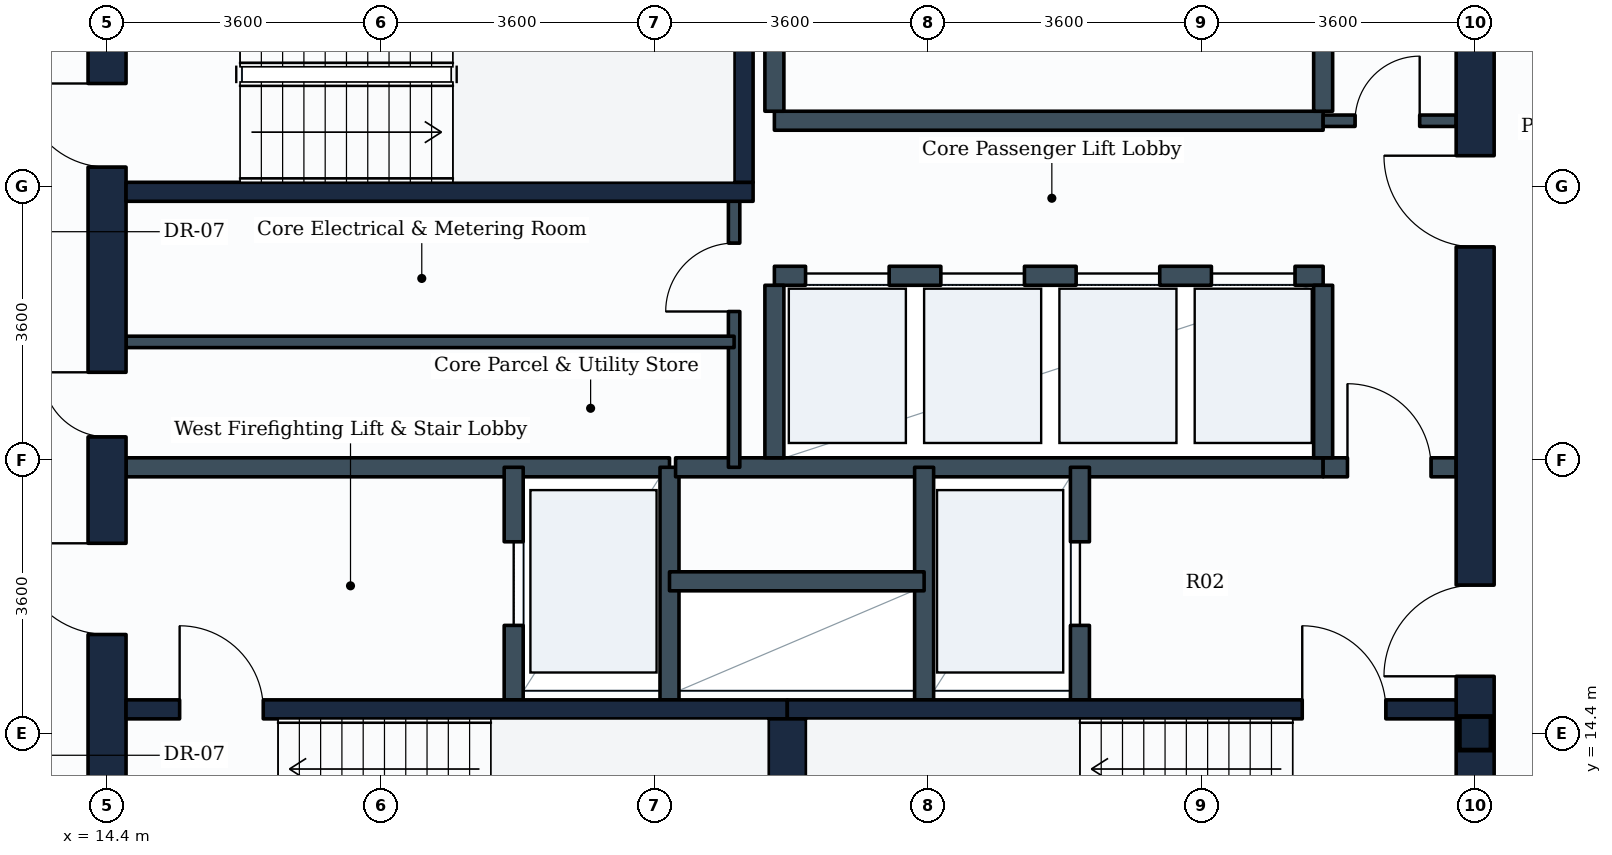
"""IFC4 building model, lengths in metres.
Left out: names, types, materials, properties, quantities, classifications, styles, units other than length and angle.
Written with IfcOpenShell. Run it as: python <this file> out.ifc"""

import sys

from ifc_helpers import new_model, si_unit, direction, frame, frame_2d, origin, origin_2d, place, context, subcontext, project, spatial, rectangle, i_section, extrude, element, fill, save


model = new_model("IFC4")
c1 = context("Model", 3, precision=1e-05, world=origin(), true_north=direction((0.0, 1.0)))
c2 = subcontext(c1, "Body", "Model", "MODEL_VIEW")
j1 = project(units=[si_unit("LENGTHUNIT", "METRE"), si_unit("PLANEANGLEUNIT", "RADIAN")], contexts=[c1])
p1 = place(None, origin())
s1 = spatial("IfcSite", under=j1, at=p1, CompositionType="ELEMENT")
p2 = place(p1, origin())
s2 = spatial("IfcBuilding", under=s1, at=p2, CompositionType="ELEMENT")
p3 = place(p2, frame((0.0, 0.0, 146.6)))
s3 = spatial("IfcBuildingStorey", under=s2, at=p3, CompositionType="ELEMENT", Elevation=146.6)
p4 = place(p3, frame((32.4, 14.4, 0.0), z_axis=(0.0, 0.0, 1.0), x_axis=(1.0, 0.0, 0.0)))
e1 = element("IfcColumn", 1, at=p4, inside=s3, PredefinedType="COLUMN", context=c2, shape_type="SweptSolid", body=[
    extrude(i_section(OverallWidth=0.416, OverallDepth=0.442, WebThickness=0.025, FlangeThickness=0.041, FilletRadius=0.015, at=origin_2d()), origin(), (0.0, 0.0, 1.0), 3.8),
])
p5 = place(p3, frame((14.4, 10.8, 0.0), z_axis=(0.0, 0.0, 1.0), x_axis=(0.0, 1.0, 0.0)))
e2 = element("IfcWall", 2, at=p5, inside=s3, PredefinedType="SHEAR", context=c2, shape_type="SweptSolid", body=[
    extrude(rectangle(XDim=14.4, YDim=0.5, at=frame_2d((7.2, 0.0))), origin(), (0.0, 0.0, 1.0), 3.55),
])
p6 = place(p5, frame((11.05, 0.0, 0.0)))
e3 = element("IfcOpeningElement", 3, at=p6, cuts=e2, PredefinedType="OPENING", context=c2, shape_type="SweptSolid", body=[
    extrude(rectangle(XDim=1.1, YDim=2.1, at=frame_2d((0.55, 1.05))), frame((0.0, 0.26, 0.0), z_axis=(0.0, -1.0, 0.0), x_axis=(1.0, 0.0, 0.0)), (0.0, 0.0, 1.0), 0.52),
])
p7 = place(p5, frame((4.9, 0.0, 0.0)))
e4 = element("IfcOpeningElement", 4, at=p7, cuts=e2, PredefinedType="OPENING", context=c2, shape_type="SweptSolid", body=[
    extrude(rectangle(XDim=1.2, YDim=2.1, at=frame_2d((0.6, 1.05))), frame((0.0, 0.26, 0.0), z_axis=(0.0, -1.0, 0.0), x_axis=(1.0, 0.0, 0.0)), (0.0, 0.0, 1.0), 0.52),
])
p8 = place(p5, frame((7.5, 0.0, 0.0)))
e5 = element("IfcOpeningElement", 5, at=p8, cuts=e2, PredefinedType="OPENING", context=c2, shape_type="SweptSolid", body=[
    extrude(rectangle(XDim=0.85, YDim=2.1, at=frame_2d((0.425, 1.05))), frame((0.0, 0.26, 0.0), z_axis=(0.0, -1.0, 0.0), x_axis=(1.0, 0.0, 0.0)), (0.0, 0.0, 1.0), 0.52),
])
p9 = place(p3, frame((32.4, 10.8, 0.0), z_axis=(0.0, 0.0, 1.0), x_axis=(0.0, 1.0, 0.0)))
e6 = element("IfcWall", 6, at=p9, inside=s3, PredefinedType="SHEAR", context=c2, shape_type="SweptSolid", body=[
    extrude(rectangle(XDim=14.4, YDim=0.5, at=frame_2d((7.2, 0.0))), origin(), (0.0, 0.0, 1.0), 3.55),
])
p10 = place(p9, frame((4.35, 0.0, 0.0)))
e7 = element("IfcOpeningElement", 7, at=p10, cuts=e6, PredefinedType="OPENING", context=c2, shape_type="SweptSolid", body=[
    extrude(rectangle(XDim=1.2, YDim=2.1, at=frame_2d((0.6, 1.05))), frame((0.0, 0.26, 0.0), z_axis=(0.0, -1.0, 0.0), x_axis=(1.0, 0.0, 0.0)), (0.0, 0.0, 1.0), 0.52),
])
p11 = place(p9, frame((10.0, 0.0, 0.0)))
e8 = element("IfcOpeningElement", 8, at=p11, cuts=e6, PredefinedType="OPENING", context=c2, shape_type="SweptSolid", body=[
    extrude(rectangle(XDim=1.2, YDim=2.1, at=frame_2d((0.6, 1.05))), frame((0.0, 0.26, 0.0), z_axis=(0.0, -1.0, 0.0), x_axis=(1.0, 0.0, 0.0)), (0.0, 0.0, 1.0), 0.52),
])
p12 = place(p3, frame((14.65, 14.715, 0.0), z_axis=(0.0, 0.0, 1.0), x_axis=(1.0, 0.0, 0.0)))
e9 = element("IfcWall", 9, at=p12, inside=s3, PredefinedType="SHEAR", context=c2, shape_type="SweptSolid", body=[
    extrude(rectangle(XDim=8.7, YDim=0.25, at=frame_2d((4.35, 0.0))), origin(), (0.0, 0.0, 1.0), 3.55),
])
p13 = place(p12, frame((0.705, 0.0, 0.0)))
e10 = element("IfcOpeningElement", 10, at=p13, cuts=e9, PredefinedType="OPENING", context=c2, shape_type="SweptSolid", body=[
    extrude(rectangle(XDim=1.1, YDim=2.1, at=frame_2d((0.55, 1.05))), frame((0.0, 0.135, 0.0), z_axis=(0.0, -1.0, 0.0), x_axis=(1.0, 0.0, 0.0)), (0.0, 0.0, 1.0), 0.27),
])
p14 = place(p3, frame((23.35, 14.715, 0.0), z_axis=(0.0, 0.0, 1.0), x_axis=(1.0, 0.0, 0.0)))
e11 = element("IfcWall", 11, at=p14, inside=s3, PredefinedType="SHEAR", context=c2, shape_type="SweptSolid", body=[
    extrude(rectangle(XDim=8.8, YDim=0.25, at=frame_2d((4.4, 0.0))), origin(), (0.0, 0.0, 1.0), 3.55),
])
p15 = place(p14, frame((6.775, 0.0, 0.0)))
e12 = element("IfcOpeningElement", 12, at=p15, cuts=e11, PredefinedType="OPENING", context=c2, shape_type="SweptSolid", body=[
    extrude(rectangle(XDim=1.1, YDim=2.1, at=frame_2d((0.55, 1.05))), frame((0.0, 0.135, 0.0), z_axis=(0.0, -1.0, 0.0), x_axis=(1.0, 0.0, 0.0)), (0.0, 0.0, 1.0), 0.27),
])
p16 = place(p3, frame((23.35, 11.75, 0.0), z_axis=(0.0, 0.0, 1.0), x_axis=(0.0, 1.0, 0.0)))
e13 = element("IfcWall", 13, at=p16, inside=s3, PredefinedType="SHEAR", context=c2, shape_type="SweptSolid", body=[
    extrude(rectangle(XDim=2.84, YDim=0.5, at=frame_2d((1.42, 0.0))), origin(), (0.0, 0.0, 1.0), 3.55),
])
p17 = place(p3, frame((14.65, 21.525, 0.0), z_axis=(0.0, 0.0, 1.0), x_axis=(1.0, 0.0, 0.0)))
e14 = element("IfcWall", 14, at=p17, inside=s3, PredefinedType="SHEAR", context=c2, shape_type="SweptSolid", body=[
    extrude(rectangle(XDim=8.25, YDim=0.25, at=frame_2d((4.125, 0.0))), origin(), (0.0, 0.0, 1.0), 3.55),
])
p18 = place(p3, frame((22.775, 21.65, 0.0), z_axis=(0.0, 0.0, 1.0), x_axis=(0.0, 1.0, 0.0)))
e15 = element("IfcWall", 15, at=p18, inside=s3, PredefinedType="SHEAR", context=c2, shape_type="SweptSolid", body=[
    extrude(rectangle(XDim=2.84, YDim=0.25, at=frame_2d((1.42, 0.0))), origin(), (0.0, 0.0, 1.0), 3.55),
])
p19 = place(p3, frame((14.65, 17.9, 0.0), z_axis=(0.0, 0.0, 1.0), x_axis=(1.0, 0.0, 0.0)))
e16 = element("IfcWall", 16, at=p19, inside=s3, PredefinedType="PARTITIONING", context=c2, shape_type="SweptSolid", body=[
    extrude(rectangle(XDim=7.15, YDim=0.25, at=frame_2d((3.575, 0.0))), origin(), (0.0, 0.0, 1.0), 3.535),
])
p20 = place(p3, frame((19.75, 14.84, 0.0), z_axis=(0.0, 0.0, 1.0), x_axis=(0.0, 1.0, 0.0)))
e17 = element("IfcWall", 17, at=p20, inside=s3, PredefinedType="PARTITIONING", context=c2, shape_type="SweptSolid", body=[
    extrude(rectangle(XDim=3.06, YDim=0.25, at=frame_2d((1.53, 0.0))), origin(), (0.0, 0.0, 1.0), 3.535),
])
p21 = place(p20, frame((0.98, 0.0, 0.0)))
e18 = element("IfcOpeningElement", 18, at=p21, cuts=e17, PredefinedType="OPENING", context=c2, shape_type="SweptSolid", body=[
    extrude(rectangle(XDim=1.1, YDim=2.1, at=frame_2d((0.55, 1.05))), frame((0.0, 0.135, 0.0), z_axis=(0.0, -1.0, 0.0), x_axis=(1.0, 0.0, 0.0)), (0.0, 0.0, 1.0), 0.27),
])
p22 = place(p3, frame((21.8, 14.84, 0.0), z_axis=(0.0, 0.0, 1.0), x_axis=(0.0, 1.0, 0.0)))
e19 = element("IfcWall", 19, at=p22, inside=s3, PredefinedType="PARTITIONING", context=c2, shape_type="SweptSolid", body=[
    extrude(rectangle(XDim=3.06, YDim=0.25, at=frame_2d((1.53, 0.0))), origin(), (0.0, 0.0, 1.0), 3.535),
])
p23 = place(p3, frame((21.88, 17.9, 0.0), z_axis=(0.0, 0.0, 1.0), x_axis=(1.0, 0.0, 0.0)))
e20 = element("IfcWall", 20, at=p23, inside=s3, PredefinedType="PARTITIONING", context=c2, shape_type="SweptSolid", body=[
    extrude(rectangle(XDim=8.52, YDim=0.25, at=frame_2d((4.26, 0.0))), origin(), (0.0, 0.0, 1.0), 3.535),
])
p24 = place(p3, frame((30.4, 17.9, 0.0), z_axis=(0.0, 0.0, 1.0), x_axis=(1.0, 0.0, 0.0)))
e21 = element("IfcWall", 21, at=p24, inside=s3, PredefinedType="PARTITIONING", context=c2, shape_type="SweptSolid", body=[
    extrude(rectangle(XDim=1.75, YDim=0.25, at=frame_2d((0.875, 0.0))), origin(), (0.0, 0.0, 1.0), 3.535),
])
p25 = place(p24, frame((0.32, 0.0, 0.0)))
e22 = element("IfcOpeningElement", 22, at=p25, cuts=e21, PredefinedType="OPENING", context=c2, shape_type="SweptSolid", body=[
    extrude(rectangle(XDim=1.1, YDim=2.1, at=frame_2d((0.55, 1.05))), frame((0.0, 0.135, 0.0), z_axis=(0.0, -1.0, 0.0), x_axis=(1.0, 0.0, 0.0)), (0.0, 0.0, 1.0), 0.27),
])
p26 = place(p3, frame((25.15, 14.84, 0.0), z_axis=(0.0, 0.0, 1.0), x_axis=(0.0, 1.0, 0.0)))
e23 = element("IfcWall", 23, at=p26, inside=s3, PredefinedType="PARTITIONING", context=c2, shape_type="SweptSolid", body=[
    extrude(rectangle(XDim=3.06, YDim=0.25, at=frame_2d((1.53, 0.0))), origin(), (0.0, 0.0, 1.0), 3.535),
])
p27 = place(p3, frame((27.2, 14.84, 0.0), z_axis=(0.0, 0.0, 1.0), x_axis=(0.0, 1.0, 0.0)))
e24 = element("IfcWall", 24, at=p27, inside=s3, PredefinedType="PARTITIONING", context=c2, shape_type="SweptSolid", body=[
    extrude(rectangle(XDim=3.06, YDim=0.25, at=frame_2d((1.53, 0.0))), origin(), (0.0, 0.0, 1.0), 3.535),
])
p28 = place(p27, frame((0.98, 0.0, 0.0)))
e25 = element("IfcOpeningElement", 25, at=p28, cuts=e24, PredefinedType="OPENING", context=c2, shape_type="SweptSolid", body=[
    extrude(rectangle(XDim=1.1, YDim=2.1, at=frame_2d((0.55, 1.05))), frame((0.0, 0.135, 0.0), z_axis=(0.0, -1.0, 0.0), x_axis=(1.0, 0.0, 0.0)), (0.0, 0.0, 1.0), 0.27),
])
p29 = place(p3, frame((21.8, 16.4, 0.0), z_axis=(0.0, 0.0, 1.0), x_axis=(1.0, 0.0, 0.0)))
e26 = element("IfcWall", 26, at=p29, inside=s3, PredefinedType="PARTITIONING", context=c2, shape_type="SweptSolid", body=[
    extrude(rectangle(XDim=3.35, YDim=0.25, at=frame_2d((1.675, 0.0))), origin(), (0.0, 0.0, 1.0), 3.535),
])
p30 = place(p3, frame((23.18, 20.42, 0.0), z_axis=(0.0, 0.0, 1.0), x_axis=(1.0, 0.0, 0.0)))
e27 = element("IfcWall", 27, at=p30, inside=s3, PredefinedType="PARTITIONING", context=c2, shape_type="SweptSolid", body=[
    extrude(rectangle(XDim=7.22, YDim=0.25, at=frame_2d((3.61, 0.0))), origin(), (0.0, 0.0, 1.0), 3.535),
])
p31 = place(p30, frame((0.41, 0.0, 0.0)))
e28 = element("IfcOpeningElement", 28, at=p31, cuts=e27, PredefinedType="OPENING", context=c2, shape_type="SweptSolid", body=[
    extrude(rectangle(XDim=1.1, YDim=2.1, at=frame_2d((0.55, 1.05))), frame((0.0, 0.135, 0.0), z_axis=(0.0, -1.0, 0.0), x_axis=(1.0, 0.0, 0.0)), (0.0, 0.0, 1.0), 0.27),
])
p32 = place(p30, frame((2.19, 0.0, 0.0)))
e29 = element("IfcOpeningElement", 29, at=p32, cuts=e27, PredefinedType="OPENING", context=c2, shape_type="SweptSolid", body=[
    extrude(rectangle(XDim=1.1, YDim=2.1, at=frame_2d((0.55, 1.05))), frame((0.0, 0.135, 0.0), z_axis=(0.0, -1.0, 0.0), x_axis=(1.0, 0.0, 0.0)), (0.0, 0.0, 1.0), 0.27),
])
p33 = place(p30, frame((3.97, 0.0, 0.0)))
e30 = element("IfcOpeningElement", 30, at=p33, cuts=e27, PredefinedType="OPENING", context=c2, shape_type="SweptSolid", body=[
    extrude(rectangle(XDim=1.1, YDim=2.1, at=frame_2d((0.55, 1.05))), frame((0.0, 0.135, 0.0), z_axis=(0.0, -1.0, 0.0), x_axis=(1.0, 0.0, 0.0)), (0.0, 0.0, 1.0), 0.27),
])
p34 = place(p30, frame((5.75, 0.0, 0.0)))
e31 = element("IfcOpeningElement", 31, at=p34, cuts=e27, PredefinedType="OPENING", context=c2, shape_type="SweptSolid", body=[
    extrude(rectangle(XDim=1.1, YDim=2.1, at=frame_2d((0.55, 1.05))), frame((0.0, 0.135, 0.0), z_axis=(0.0, -1.0, 0.0), x_axis=(1.0, 0.0, 0.0)), (0.0, 0.0, 1.0), 0.27),
])
for number, where, z_axis, x_axis in (
    (32, (23.18, 18.025, 0.0), (0.0, 0.0, 1.0), (0.0, 1.0, 0.0)),
    (33, (30.4, 18.025, 0.0), (0.0, 0.0, 1.0), (0.0, 1.0, 0.0)),
):
    element("IfcWall", number, at=place(p3, frame(where, z_axis=z_axis, x_axis=x_axis)), inside=s3, PredefinedType="PARTITIONING", context=c2, shape_type="SweptSolid", body=[
        extrude(rectangle(XDim=2.27, YDim=0.25, at=frame_2d((1.135, 0.0))), origin(), (0.0, 0.0, 1.0), 3.535),
    ])
p35 = place(p3, frame((23.18, 22.46, 0.0), z_axis=(0.0, 0.0, 1.0), x_axis=(1.0, 0.0, 0.0)))
e34 = element("IfcWall", 34, at=p35, inside=s3, PredefinedType="PARTITIONING", context=c2, shape_type="SweptSolid", body=[
    extrude(rectangle(XDim=7.22, YDim=0.25, at=frame_2d((3.61, 0.0))), origin(), (0.0, 0.0, 1.0), 3.535),
])
for number, where, z_axis, x_axis in (
    (35, (23.18, 22.585, 0.0), (0.0, 0.0, 1.0), (0.0, 1.0, 0.0)),
    (36, (30.4, 22.585, 0.0), (0.0, 0.0, 1.0), (0.0, 1.0, 0.0)),
):
    element("IfcWall", number, at=place(p3, frame(where, z_axis=z_axis, x_axis=x_axis)), inside=s3, PredefinedType="PARTITIONING", context=c2, shape_type="SweptSolid", body=[
        extrude(rectangle(XDim=2.315, YDim=0.25, at=frame_2d((1.157, 0.0))), origin(), (0.0, 0.0, 1.0), 3.535),
    ])
p36 = place(p3, frame((22.65, 17.9, 0.0), z_axis=(0.0, 0.0, 1.0), x_axis=(0.0, 1.0, 0.0)))
e37 = element("IfcWall", 37, at=p36, inside=s3, PredefinedType="PARTITIONING", context=c2, shape_type="SweptSolid", body=[
    extrude(rectangle(XDim=3.625, YDim=0.15, at=frame_2d((1.812, 0.0))), origin(), (0.0, 0.0, 1.0), 3.535),
])
p37 = place(p36, frame((2.05, 0.0, 0.0)))
e38 = element("IfcOpeningElement", 38, at=p37, cuts=e37, PredefinedType="OPENING", context=c2, shape_type="SweptSolid", body=[
    extrude(rectangle(XDim=0.9, YDim=2.1, at=frame_2d((0.45, 1.05))), frame((0.0, 0.085, 0.0), z_axis=(0.0, -1.0, 0.0), x_axis=(1.0, 0.0, 0.0)), (0.0, 0.0, 1.0), 0.17),
])
p38 = place(p3, frame((14.65, 19.55, 0.0), z_axis=(0.0, 0.0, 1.0), x_axis=(1.0, 0.0, 0.0)))
e39 = element("IfcWall", 39, at=p38, inside=s3, PredefinedType="PARTITIONING", context=c2, shape_type="SweptSolid", body=[
    extrude(rectangle(XDim=8.0, YDim=0.15, at=frame_2d((4.0, 0.0))), origin(), (0.0, 0.0, 1.0), 3.535),
])
p39 = place(p3, frame((30.4, 22.46, 0.0), z_axis=(0.0, 0.0, 1.0), x_axis=(1.0, 0.0, 0.0)))
e40 = element("IfcWall", 40, at=p39, inside=s3, PredefinedType="PARTITIONING", context=c2, shape_type="SweptSolid", body=[
    extrude(rectangle(XDim=1.75, YDim=0.15, at=frame_2d((0.875, 0.0))), origin(), (0.0, 0.0, 1.0), 3.535),
])
p40 = place(p39, frame((0.42, 0.0, 0.0)))
e41 = element("IfcOpeningElement", 41, at=p40, cuts=e40, PredefinedType="OPENING", context=c2, shape_type="SweptSolid", body=[
    extrude(rectangle(XDim=0.85, YDim=2.1, at=frame_2d((0.425, 1.05))), frame((0.0, 0.085, 0.0), z_axis=(0.0, -1.0, 0.0), x_axis=(1.0, 0.0, 0.0)), (0.0, 0.0, 1.0), 0.17),
])
p41 = place(p13, origin())
e42 = element("IfcDoor", 42, at=p41, inside=s3, OperationType="SINGLE_SWING_LEFT", PredefinedType="DOOR", context=c2, shape_type="SweptSolid", body=[
    extrude(rectangle(XDim=1.1, YDim=2.1, at=frame_2d((0.55, 1.05))), frame((0.0, 0.025, 0.0), z_axis=(0.0, -1.0, 0.0), x_axis=(1.0, 0.0, 0.0)), (0.0, 0.0, 1.0), 0.05),
])
fill(e10, e42)
p42 = place(p15, origin())
e43 = element("IfcDoor", 43, at=p42, inside=s3, OperationType="SINGLE_SWING_LEFT", PredefinedType="DOOR", context=c2, shape_type="SweptSolid", body=[
    extrude(rectangle(XDim=1.1, YDim=2.1, at=frame_2d((0.55, 1.05))), frame((0.0, 0.025, 0.0), z_axis=(0.0, -1.0, 0.0), x_axis=(1.0, 0.0, 0.0)), (0.0, 0.0, 1.0), 0.05),
])
fill(e12, e43)
p43 = place(p6, origin())
e44 = element("IfcDoor", 44, at=p43, inside=s3, OperationType="SINGLE_SWING_RIGHT", PredefinedType="DOOR", context=c2, shape_type="SweptSolid", body=[
    extrude(rectangle(XDim=1.1, YDim=2.1, at=frame_2d((0.55, 1.05))), frame((0.0, 0.025, 0.0), z_axis=(0.0, -1.0, 0.0), x_axis=(1.0, 0.0, 0.0)), (0.0, 0.0, 1.0), 0.05),
])
fill(e3, e44)
p44 = place(p21, origin())
e45 = element("IfcDoor", 45, at=p44, inside=s3, OperationType="SLIDING_TO_LEFT", PredefinedType="DOOR", context=c2, shape_type="SweptSolid", body=[
    extrude(rectangle(XDim=1.1, YDim=2.1, at=frame_2d((0.55, 1.05))), frame((0.0, 0.025, 0.0), z_axis=(0.0, -1.0, 0.0), x_axis=(1.0, 0.0, 0.0)), (0.0, 0.0, 1.0), 0.05),
])
fill(e18, e45)
p45 = place(p28, origin())
e46 = element("IfcDoor", 46, at=p45, inside=s3, OperationType="SLIDING_TO_LEFT", PredefinedType="DOOR", context=c2, shape_type="SweptSolid", body=[
    extrude(rectangle(XDim=1.1, YDim=2.1, at=frame_2d((0.55, 1.05))), frame((0.0, 0.025, 0.0), z_axis=(0.0, -1.0, 0.0), x_axis=(1.0, 0.0, 0.0)), (0.0, 0.0, 1.0), 0.05),
])
fill(e25, e46)
p46 = place(p7, origin())
e47 = element("IfcDoor", 47, at=p46, inside=s3, OperationType="SINGLE_SWING_RIGHT", PredefinedType="DOOR", context=c2, shape_type="SweptSolid", body=[
    extrude(rectangle(XDim=1.2, YDim=2.1, at=frame_2d((0.6, 1.05))), frame((0.0, 0.025, 0.0), z_axis=(0.0, -1.0, 0.0), x_axis=(1.0, 0.0, 0.0)), (0.0, 0.0, 1.0), 0.05),
])
fill(e4, e47)
p47 = place(p10, origin())
e48 = element("IfcDoor", 48, at=p47, inside=s3, OperationType="SINGLE_SWING_LEFT", PredefinedType="DOOR", context=c2, shape_type="SweptSolid", body=[
    extrude(rectangle(XDim=1.2, YDim=2.1, at=frame_2d((0.6, 1.05))), frame((0.0, 0.025, 0.0), z_axis=(0.0, -1.0, 0.0), x_axis=(1.0, 0.0, 0.0)), (0.0, 0.0, 1.0), 0.05),
])
fill(e7, e48)
p48 = place(p25, origin())
e49 = element("IfcDoor", 49, at=p48, inside=s3, OperationType="SINGLE_SWING_LEFT", PredefinedType="DOOR", context=c2, shape_type="SweptSolid", body=[
    extrude(rectangle(XDim=1.1, YDim=2.1, at=frame_2d((0.55, 1.05))), frame((0.0, 0.025, 0.0), z_axis=(0.0, -1.0, 0.0), x_axis=(1.0, 0.0, 0.0)), (0.0, 0.0, 1.0), 0.05),
])
fill(e22, e49)
p49 = place(p31, origin())
e50 = element("IfcDoor", 50, at=p49, inside=s3, OperationType="SLIDING_TO_LEFT", PredefinedType="DOOR", context=c2, shape_type="SweptSolid", body=[
    extrude(rectangle(XDim=1.1, YDim=2.1, at=frame_2d((0.55, 1.05))), frame((0.0, 0.025, 0.0), z_axis=(0.0, -1.0, 0.0), x_axis=(1.0, 0.0, 0.0)), (0.0, 0.0, 1.0), 0.05),
])
fill(e28, e50)
p50 = place(p32, origin())
e51 = element("IfcDoor", 51, at=p50, inside=s3, OperationType="SLIDING_TO_LEFT", PredefinedType="DOOR", context=c2, shape_type="SweptSolid", body=[
    extrude(rectangle(XDim=1.1, YDim=2.1, at=frame_2d((0.55, 1.05))), frame((0.0, 0.025, 0.0), z_axis=(0.0, -1.0, 0.0), x_axis=(1.0, 0.0, 0.0)), (0.0, 0.0, 1.0), 0.05),
])
fill(e29, e51)
p51 = place(p33, origin())
e52 = element("IfcDoor", 52, at=p51, inside=s3, OperationType="SLIDING_TO_LEFT", PredefinedType="DOOR", context=c2, shape_type="SweptSolid", body=[
    extrude(rectangle(XDim=1.1, YDim=2.1, at=frame_2d((0.55, 1.05))), frame((0.0, 0.025, 0.0), z_axis=(0.0, -1.0, 0.0), x_axis=(1.0, 0.0, 0.0)), (0.0, 0.0, 1.0), 0.05),
])
fill(e30, e52)
p52 = place(p34, origin())
e53 = element("IfcDoor", 53, at=p52, inside=s3, OperationType="SLIDING_TO_LEFT", PredefinedType="DOOR", context=c2, shape_type="SweptSolid", body=[
    extrude(rectangle(XDim=1.1, YDim=2.1, at=frame_2d((0.55, 1.05))), frame((0.0, 0.025, 0.0), z_axis=(0.0, -1.0, 0.0), x_axis=(1.0, 0.0, 0.0)), (0.0, 0.0, 1.0), 0.05),
])
fill(e31, e53)
p53 = place(p11, origin())
e54 = element("IfcDoor", 54, at=p53, inside=s3, OperationType="SINGLE_SWING_RIGHT", PredefinedType="DOOR", context=c2, shape_type="SweptSolid", body=[
    extrude(rectangle(XDim=1.2, YDim=2.1, at=frame_2d((0.6, 1.05))), frame((0.0, 0.025, 0.0), z_axis=(0.0, -1.0, 0.0), x_axis=(1.0, 0.0, 0.0)), (0.0, 0.0, 1.0), 0.05),
])
fill(e8, e54)
p54 = place(p8, origin())
e55 = element("IfcDoor", 55, at=p54, inside=s3, OperationType="SINGLE_SWING_RIGHT", PredefinedType="DOOR", context=c2, shape_type="SweptSolid", body=[
    extrude(rectangle(XDim=0.85, YDim=2.1, at=frame_2d((0.425, 1.05))), frame((0.0, 0.025, 0.0), z_axis=(0.0, -1.0, 0.0), x_axis=(1.0, 0.0, 0.0)), (0.0, 0.0, 1.0), 0.05),
])
fill(e5, e55)
p55 = place(p37, origin())
e56 = element("IfcDoor", 56, at=p55, inside=s3, OperationType="SINGLE_SWING_LEFT", PredefinedType="DOOR", context=c2, shape_type="SweptSolid", body=[
    extrude(rectangle(XDim=0.9, YDim=2.1, at=frame_2d((0.45, 1.05))), frame((0.0, 0.025, 0.0), z_axis=(0.0, -1.0, 0.0), x_axis=(1.0, 0.0, 0.0)), (0.0, 0.0, 1.0), 0.05),
])
fill(e38, e56)
p56 = place(p40, origin())
e57 = element("IfcDoor", 57, at=p56, inside=s3, OperationType="SINGLE_SWING_RIGHT", PredefinedType="DOOR", context=c2, shape_type="SweptSolid", body=[
    extrude(rectangle(XDim=0.85, YDim=2.1, at=frame_2d((0.425, 1.05))), frame((0.0, 0.025, 0.0), z_axis=(0.0, -1.0, 0.0), x_axis=(1.0, 0.0, 0.0)), (0.0, 0.0, 1.0), 0.05),
])
fill(e41, e57)
save(model, sys.argv[1])
